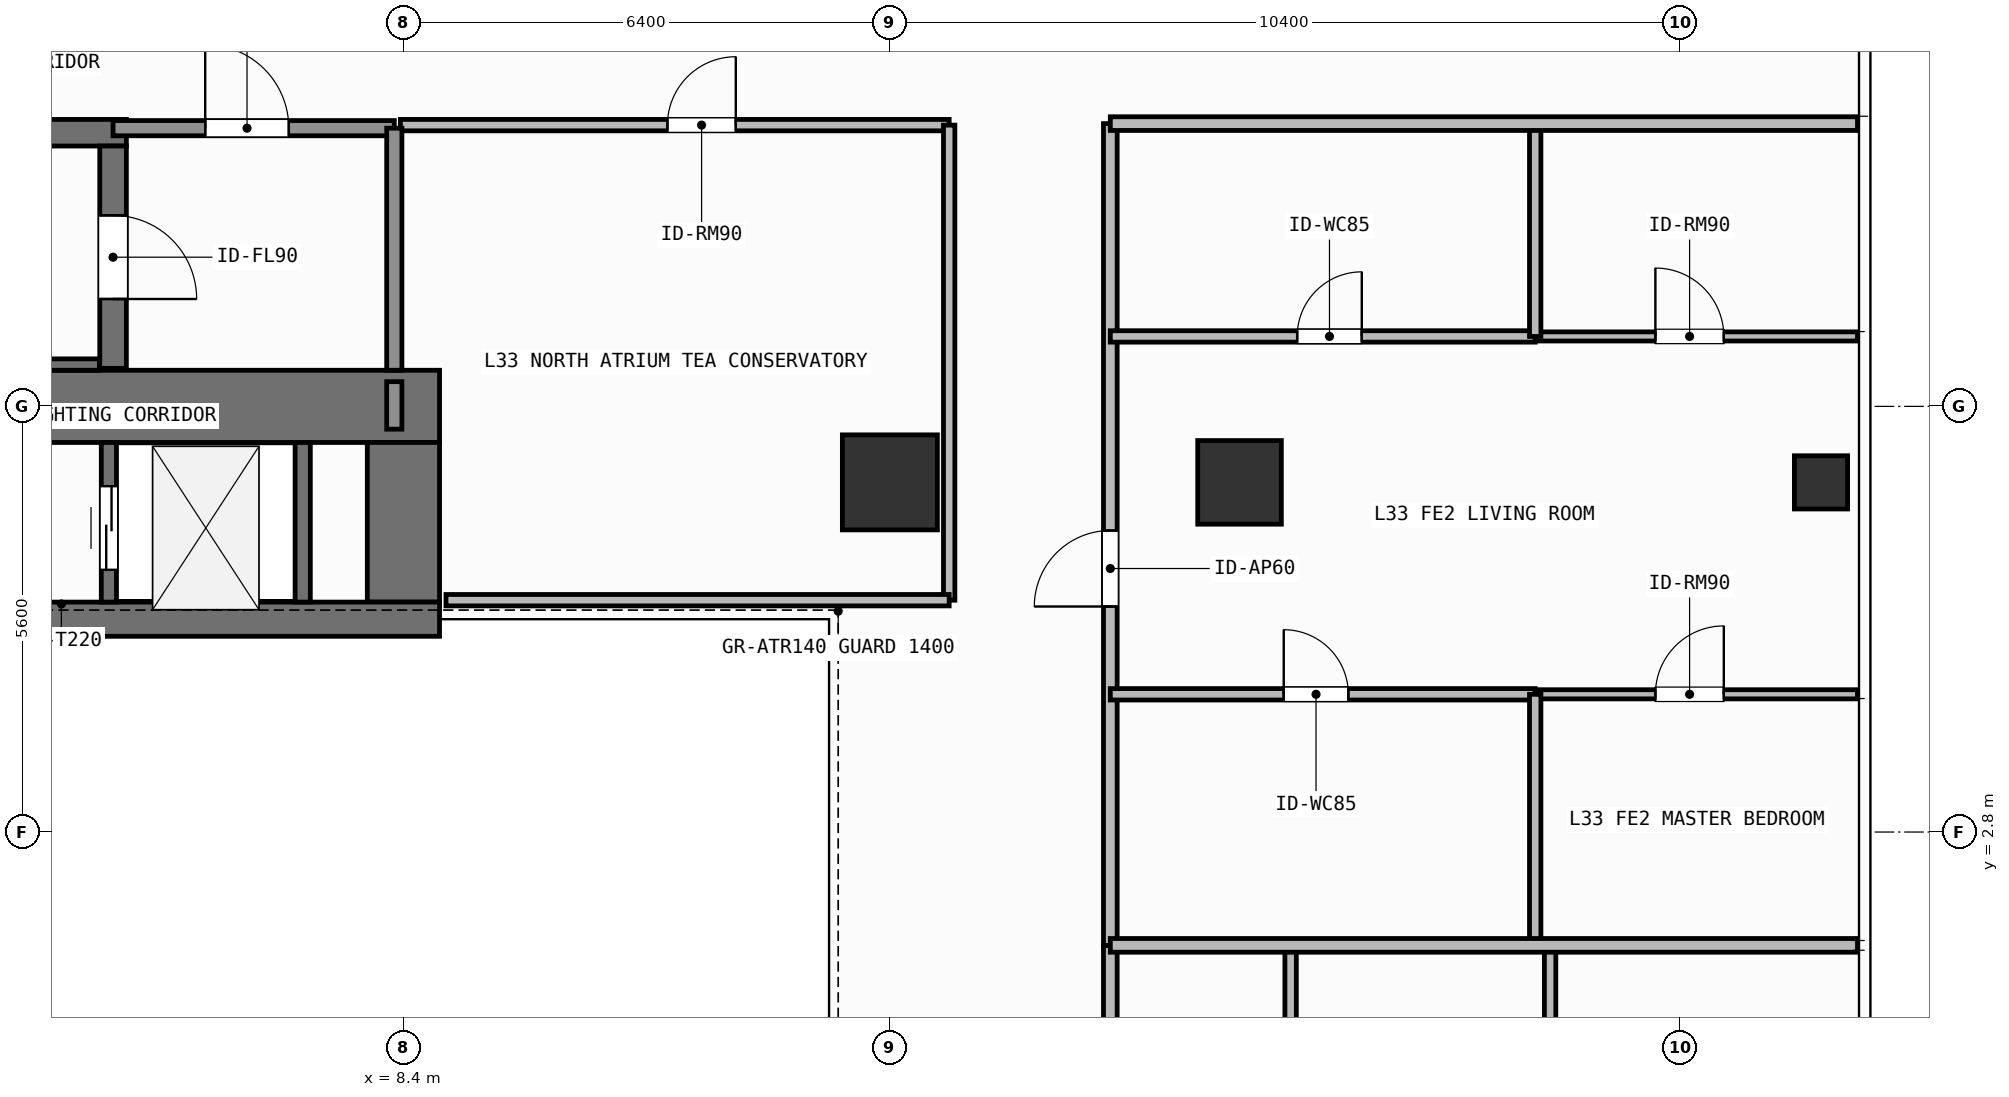
"""IFC4 building model, lengths in metres.
Left out: names, types, materials, properties, quantities, classifications, styles, units other than length and angle.
Written with IfcOpenShell. Run it as: python <this file> out.ifc"""

import sys

from ifc_helpers import new_model, si_unit, direction, frame, frame_2d, origin, origin_2d, place, context, subcontext, project, spatial, rectangle, hollow_rectangle, extrude, element, fill, save


model = new_model("IFC4")
c1 = context("Model", 3, precision=1e-05, world=origin(), true_north=direction((0.0, 1.0)))
c2 = subcontext(c1, "Body", "Model", "MODEL_VIEW")
j1 = project(units=[si_unit("LENGTHUNIT", "METRE"), si_unit("PLANEANGLEUNIT", "RADIAN")], contexts=[c1])
p1 = place(None, origin())
s1 = spatial("IfcSite", under=j1, at=p1, CompositionType="ELEMENT")
p2 = place(p1, origin())
s2 = spatial("IfcBuilding", under=s1, at=p2, CompositionType="ELEMENT")
p3 = place(p2, frame((0.0, 0.0, 132.9)))
s3 = spatial("IfcBuildingStorey", under=s2, at=p3, CompositionType="ELEMENT", Elevation=132.9)
p4 = place(p3, frame((-7.55, 8.4, 0.0), z_axis=(0.0, 0.0, 1.0), x_axis=(1.0, 0.0, 0.0)))
e1 = element("IfcWall", 1, at=p4, inside=s3, PredefinedType="SHEAR", context=c2, shape_type="SweptSolid", body=[
    extrude(rectangle(XDim=16.425, YDim=0.95, at=frame_2d((8.212, 0.0))), origin(), (0.0, 0.0, 1.0), 3.9),
])
p5 = place(p3, frame((8.4, 5.825, 0.0), z_axis=(0.0, 0.0, 1.0), x_axis=(0.0, 1.0, 0.0)))
e2 = element("IfcWall", 2, at=p5, inside=s3, PredefinedType="SHEAR", context=c2, shape_type="SweptSolid", body=[
    extrude(rectangle(XDim=2.1, YDim=0.95, at=frame_2d((1.05, 0.0))), origin(), (0.0, 0.0, 1.0), 3.9),
])
p6 = place(p3, frame((3.045, 5.6, 0.0), z_axis=(0.0, 0.0, 1.0), x_axis=(1.0, 0.0, 0.0)))
e3 = element("IfcWall", 3, at=p6, inside=s3, PredefinedType="SHEAR", context=c2, shape_type="SweptSolid", body=[
    extrude(rectangle(XDim=5.83, YDim=0.45, at=frame_2d((2.915, 0.0))), origin(), (0.0, 0.0, 1.0), 3.9),
])
p7 = place(p3, frame((-2.555, 12.0, 0.0), z_axis=(0.0, 0.0, 1.0), x_axis=(1.0, 0.0, 0.0)))
e4 = element("IfcWall", 4, at=p7, inside=s3, PredefinedType="SHEAR", context=c2, shape_type="SweptSolid", body=[
    extrude(rectangle(XDim=7.31, YDim=0.35, at=frame_2d((3.655, 0.0))), origin(), (0.0, 0.0, 1.0), 3.9),
])
p8 = place(p3, frame((-2.2, 8.95, 0.0), z_axis=(0.0, 0.0, 1.0), x_axis=(1.0, 0.0, 0.0)))
e5 = element("IfcWall", 5, at=p8, inside=s3, PredefinedType="SHEAR", context=c2, shape_type="SweptSolid", body=[
    extrude(rectangle(XDim=6.6, YDim=0.15, at=frame_2d((3.3, 0.0))), origin(), (0.0, 0.0, 1.0), 3.9),
])
p9 = place(p3, frame((4.58, 11.825, 0.0), z_axis=(0.0, 0.0, 1.0), x_axis=(0.0, -1.0, 0.0)))
e6 = element("IfcWall", 6, at=p9, inside=s3, PredefinedType="SHEAR", context=c2, shape_type="SweptSolid", body=[
    extrude(rectangle(XDim=2.925, YDim=0.35, at=frame_2d((1.462, 0.0))), origin(), (0.0, 0.0, 1.0), 3.9),
])
p10 = place(p9, frame((0.913, 0.0, 0.0)))
e7 = element("IfcOpeningElement", 7, at=p10, cuts=e6, PredefinedType="OPENING", context=c2, shape_type="SweptSolid", body=[
    extrude(rectangle(XDim=1.1, YDim=2.15, at=frame_2d((0.55, 1.075))), frame((0.0, 0.185, 0.0), z_axis=(0.0, -1.0, 0.0), x_axis=(1.0, 0.0, 0.0)), (0.0, 0.0, 1.0), 0.37),
])
p11 = place(p3, frame((14.8, 7.4, 0.0), z_axis=(0.0, 0.0, 1.0), x_axis=(1.0, 0.0, 0.0)))
e8 = element("IfcColumn", 8, at=p11, inside=s3, PredefinedType="COLUMN", context=c2, shape_type="SweptSolid", body=[
    extrude(rectangle(XDim=1.25, YDim=1.25, at=origin_2d()), origin(), (0.0, 0.0, 1.0), 3.9),
])
p12 = place(p3, frame((19.4, 7.4, 0.0), z_axis=(0.0, 0.0, 1.0), x_axis=(1.0, 0.0, 0.0)))
e9 = element("IfcColumn", 9, at=p12, inside=s3, PredefinedType="COLUMN", context=c2, shape_type="SweptSolid", body=[
    extrude(rectangle(XDim=1.1, YDim=1.1, at=origin_2d()), origin(), (0.0, 0.0, 1.0), 3.9),
])
p13 = place(p3, frame((27.05, 7.4, 0.0), z_axis=(0.0, 0.0, 1.0), x_axis=(1.0, 0.0, 0.0)))
e10 = element("IfcColumn", 10, at=p13, inside=s3, PredefinedType="COLUMN", context=c2, shape_type="SweptSolid", body=[
    extrude(hollow_rectangle(XDim=0.7, YDim=0.7, WallThickness=0.032, at=origin_2d()), origin(), (0.0, 0.0, 1.0), 3.9),
])
p14 = place(p3, frame((4.525, 5.825, 0.0), z_axis=(0.0, 0.0, 1.0), x_axis=(0.0, 1.0, 0.0)))
e11 = element("IfcWall", 11, at=p14, inside=s3, PredefinedType="SHEAR", context=c2, shape_type="SweptSolid", body=[
    extrude(rectangle(XDim=2.1, YDim=0.2, at=frame_2d((1.05, 0.0))), origin(), (0.0, 0.0, 1.0), 3.62),
])
p15 = place(p14, frame((0.425, 0.0, 0.0)))
e12 = element("IfcOpeningElement", 12, at=p15, cuts=e11, PredefinedType="OPENING", context=c2, shape_type="SweptSolid", body=[
    extrude(rectangle(XDim=1.1, YDim=2.2, at=frame_2d((0.55, 1.1))), frame((0.0, 0.11, 0.0), z_axis=(0.0, -1.0, 0.0), x_axis=(1.0, 0.0, 0.0)), (0.0, 0.0, 1.0), 0.22),
])
p16 = place(p3, frame((7.075, 5.825, 0.0), z_axis=(0.0, 0.0, 1.0), x_axis=(0.0, 1.0, 0.0)))
e13 = element("IfcWall", 13, at=p16, inside=s3, PredefinedType="SHEAR", context=c2, shape_type="SweptSolid", body=[
    extrude(rectangle(XDim=2.1, YDim=0.2, at=frame_2d((1.05, 0.0))), origin(), (0.0, 0.0, 1.0), 3.62),
])
p17 = place(p3, frame((4.58, 12.06, 0.0), z_axis=(0.0, 0.0, 1.0), x_axis=(1.0, 0.0, 0.0)))
e14 = element("IfcWall", 14, at=p17, inside=s3, PredefinedType="SOLIDWALL", context=c2, shape_type="SweptSolid", body=[
    extrude(rectangle(XDim=3.7, YDim=0.2, at=frame_2d((1.85, 0.0))), origin(), (0.0, 0.0, 1.0), 3.62),
])
p18 = place(p17, frame((1.212, 0.0, 0.0)))
e15 = element("IfcOpeningElement", 15, at=p18, cuts=e14, PredefinedType="OPENING", context=c2, shape_type="SweptSolid", body=[
    extrude(rectangle(XDim=1.1, YDim=2.15, at=frame_2d((0.55, 1.075))), frame((0.0, 0.11, 0.0), z_axis=(0.0, -1.0, 0.0), x_axis=(1.0, 0.0, 0.0)), (0.0, 0.0, 1.0), 0.22),
])
p19 = place(p3, frame((8.36, 12.1, 0.0), z_axis=(0.0, 0.0, 1.0), x_axis=(1.0, 0.0, 0.0)))
e16 = element("IfcWall", 16, at=p19, inside=s3, PredefinedType="PARTITIONING", context=c2, shape_type="SweptSolid", body=[
    extrude(rectangle(XDim=7.22, YDim=0.15, at=frame_2d((3.61, 0.0))), origin(), (0.0, 0.0, 1.0), 3.62),
])
p20 = place(p19, frame((3.513, 0.0, 0.0)))
e17 = element("IfcOpeningElement", 17, at=p20, cuts=e16, PredefinedType="OPENING", context=c2, shape_type="SweptSolid", body=[
    extrude(rectangle(XDim=0.9, YDim=2.1, at=frame_2d((0.45, 1.05))), frame((0.0, 0.085, 0.0), z_axis=(0.0, -1.0, 0.0), x_axis=(1.0, 0.0, 0.0)), (0.0, 0.0, 1.0), 0.17),
])
p21 = place(p3, frame((17.7, -12.12, 0.0), z_axis=(0.0, 0.0, 1.0), x_axis=(0.0, 1.0, 0.0)))
e18 = element("IfcWall", 18, at=p21, inside=s3, PredefinedType="PARTITIONING", context=c2, shape_type="SweptSolid", body=[
    extrude(rectangle(XDim=13.429, YDim=0.18, at=frame_2d((6.715, 0.0))), origin(), (0.0, 0.0, 1.0), 3.62),
])
p22 = place(p21, frame((5.324, 0.0, 0.0)))
e19 = element("IfcOpeningElement", 19, at=p22, cuts=e18, PredefinedType="OPENING", context=c2, shape_type="SweptSolid", body=[
    extrude(rectangle(XDim=1.0, YDim=2.2, at=frame_2d((0.5, 1.1))), frame((0.0, 0.1, 0.0), z_axis=(0.0, -1.0, 0.0), x_axis=(1.0, 0.0, 0.0)), (0.0, 0.0, 1.0), 0.2),
])
p23 = place(p3, frame((17.7, 1.309, 0.0), z_axis=(0.0, 0.0, 1.0), x_axis=(0.0, 1.0, 0.0)))
e20 = element("IfcWall", 20, at=p23, inside=s3, PredefinedType="PARTITIONING", context=c2, shape_type="SweptSolid", body=[
    extrude(rectangle(XDim=10.811, YDim=0.18, at=frame_2d((5.406, 0.0))), origin(), (0.0, 0.0, 1.0), 3.62),
])
p24 = place(p23, frame((4.458, 0.0, 0.0)))
e21 = element("IfcOpeningElement", 21, at=p24, cuts=e20, PredefinedType="OPENING", context=c2, shape_type="SweptSolid", body=[
    extrude(rectangle(XDim=1.0, YDim=2.2, at=frame_2d((0.5, 1.1))), frame((0.0, 0.1, 0.0), z_axis=(0.0, -1.0, 0.0), x_axis=(1.0, 0.0, 0.0)), (0.0, 0.0, 1.0), 0.2),
])
p25 = place(p3, frame((17.7, 9.32, 0.0), z_axis=(0.0, 0.0, 1.0), x_axis=(1.0, 0.0, 0.0)))
e22 = element("IfcWall", 22, at=p25, inside=s3, PredefinedType="PARTITIONING", context=c2, shape_type="SweptSolid", body=[
    extrude(rectangle(XDim=5.59, YDim=0.15, at=frame_2d((2.795, 0.0))), origin(), (0.0, 0.0, 1.0), 3.62),
])
p26 = place(p25, frame((2.458, 0.0, 0.0)))
e23 = element("IfcOpeningElement", 23, at=p26, cuts=e22, PredefinedType="OPENING", context=c2, shape_type="SweptSolid", body=[
    extrude(rectangle(XDim=0.85, YDim=2.1, at=frame_2d((0.425, 1.05))), frame((0.0, 0.085, 0.0), z_axis=(0.0, -1.0, 0.0), x_axis=(1.0, 0.0, 0.0)), (0.0, 0.0, 1.0), 0.17),
])
p27 = place(p3, frame((17.7, 4.612, 0.0), z_axis=(0.0, 0.0, 1.0), x_axis=(1.0, 0.0, 0.0)))
e24 = element("IfcWall", 24, at=p27, inside=s3, PredefinedType="PARTITIONING", context=c2, shape_type="SweptSolid", body=[
    extrude(rectangle(XDim=5.59, YDim=0.15, at=frame_2d((2.795, 0.0))), origin(), (0.0, 0.0, 1.0), 3.62),
])
p28 = place(p27, frame((2.281, 0.0, 0.0)))
e25 = element("IfcOpeningElement", 25, at=p28, cuts=e24, PredefinedType="OPENING", context=c2, shape_type="SweptSolid", body=[
    extrude(rectangle(XDim=0.85, YDim=2.1, at=frame_2d((0.425, 1.05))), frame((0.0, 0.085, 0.0), z_axis=(0.0, -1.0, 0.0), x_axis=(1.0, 0.0, 0.0)), (0.0, 0.0, 1.0), 0.17),
])
p29 = place(p3, frame((23.29, 4.612, 0.0), z_axis=(0.0, 0.0, 1.0), x_axis=(1.0, 0.0, 0.0)))
e26 = element("IfcWall", 26, at=p29, inside=s3, PredefinedType="PARTITIONING", context=c2, shape_type="SweptSolid", body=[
    extrude(rectangle(XDim=4.24, YDim=0.12, at=frame_2d((2.12, 0.0))), origin(), (0.0, 0.0, 1.0), 3.62),
])
p30 = place(p29, frame((1.581, 0.0, 0.0)))
e27 = element("IfcOpeningElement", 27, at=p30, cuts=e26, PredefinedType="OPENING", context=c2, shape_type="SweptSolid", body=[
    extrude(rectangle(XDim=0.9, YDim=2.1, at=frame_2d((0.45, 1.05))), frame((0.0, 0.07, 0.0), z_axis=(0.0, -1.0, 0.0), x_axis=(1.0, 0.0, 0.0)), (0.0, 0.0, 1.0), 0.14),
])
p31 = place(p3, frame((23.29, 9.32, 0.0), z_axis=(0.0, 0.0, 1.0), x_axis=(1.0, 0.0, 0.0)))
e28 = element("IfcWall", 28, at=p31, inside=s3, PredefinedType="PARTITIONING", context=c2, shape_type="SweptSolid", body=[
    extrude(rectangle(XDim=4.24, YDim=0.12, at=frame_2d((2.12, 0.0))), origin(), (0.0, 0.0, 1.0), 3.62),
])
p32 = place(p31, frame((1.581, 0.0, 0.0)))
e29 = element("IfcOpeningElement", 29, at=p32, cuts=e28, PredefinedType="OPENING", context=c2, shape_type="SweptSolid", body=[
    extrude(rectangle(XDim=0.9, YDim=2.1, at=frame_2d((0.45, 1.05))), frame((0.0, 0.07, 0.0), z_axis=(0.0, -1.0, 0.0), x_axis=(1.0, 0.0, 0.0)), (0.0, 0.0, 1.0), 0.14),
])
p33 = place(p3, frame((8.28, 8.875, 0.0), z_axis=(0.0, 0.0, 1.0), x_axis=(0.0, 1.0, 0.0)))
e30 = element("IfcWall", 30, at=p33, inside=s3, PredefinedType="SOLIDWALL", context=c2, shape_type="SweptSolid", body=[
    extrude(rectangle(XDim=3.185, YDim=0.2, at=frame_2d((1.593, 0.0))), origin(), (0.0, 0.0, 1.0), 3.62),
])
p34 = place(p3, frame((8.28, 8.1, 0.0), z_axis=(0.0, 0.0, 1.0), x_axis=(0.0, 1.0, 0.0)))
e31 = element("IfcWall", 31, at=p34, inside=s3, PredefinedType="SOLIDWALL", context=c2, shape_type="SweptSolid", body=[
    extrude(rectangle(XDim=0.625, YDim=0.2, at=frame_2d((0.312, 0.0))), origin(), (0.0, 0.0, 1.0), 3.62),
])
p35 = place(p3, frame((15.58, 5.85, 0.0), z_axis=(0.0, 0.0, 1.0), x_axis=(0.0, 1.0, 0.0)))
e32 = element("IfcWall", 32, at=p35, inside=s3, PredefinedType="PARTITIONING", context=c2, shape_type="SweptSolid", body=[
    extrude(rectangle(XDim=6.25, YDim=0.15, at=frame_2d((3.125, 0.0))), origin(), (0.0, 0.0, 1.0), 3.62),
])
p36 = place(p3, frame((8.96, 5.85, 0.0), z_axis=(0.0, 0.0, 1.0), x_axis=(1.0, 0.0, 0.0)))
e33 = element("IfcWall", 33, at=p36, inside=s3, PredefinedType="PARTITIONING", context=c2, shape_type="SweptSolid", body=[
    extrude(rectangle(XDim=6.62, YDim=0.15, at=frame_2d((3.31, 0.0))), origin(), (0.0, 0.0, 1.0), 3.62),
])
for number, where, z_axis, x_axis in (
    (34, (20.072, -3.317, 0.0), (0.0, 0.0, 1.0), (0.0, 1.0, 0.0)),
    (35, (23.486, -3.317, 0.0), (0.0, 0.0, 1.0), (0.0, 1.0, 0.0)),
):
    element("IfcWall", number, at=place(p3, frame(where, z_axis=z_axis, x_axis=x_axis)), inside=s3, PredefinedType="PARTITIONING", context=c2, shape_type="SweptSolid", body=[
        extrude(rectangle(XDim=4.626, YDim=0.15, at=frame_2d((2.313, 0.0))), origin(), (0.0, 0.0, 1.0), 3.62),
    ])
p37 = place(p3, frame((23.29, 1.309, 0.0), z_axis=(0.0, 0.0, 1.0), x_axis=(0.0, 1.0, 0.0)))
e36 = element("IfcWall", 36, at=p37, inside=s3, PredefinedType="PARTITIONING", context=c2, shape_type="SweptSolid", body=[
    extrude(rectangle(XDim=3.303, YDim=0.15, at=frame_2d((1.651, 0.0))), origin(), (0.0, 0.0, 1.0), 3.62),
])
p38 = place(p3, frame((23.29, 9.32, 0.0), z_axis=(0.0, 0.0, 1.0), x_axis=(0.0, 1.0, 0.0)))
e37 = element("IfcWall", 37, at=p38, inside=s3, PredefinedType="PARTITIONING", context=c2, shape_type="SweptSolid", body=[
    extrude(rectangle(XDim=2.8, YDim=0.15, at=frame_2d((1.4, 0.0))), origin(), (0.0, 0.0, 1.0), 3.62),
])
for number, where, z_axis, x_axis in (
    (38, (17.7, 1.309, 0.0), (0.0, 0.0, 1.0), (1.0, 0.0, 0.0)),
    (39, (17.7, 12.12, 0.0), (0.0, 0.0, 1.0), (1.0, 0.0, 0.0)),
):
    element("IfcWall", number, at=place(p3, frame(where, z_axis=z_axis, x_axis=x_axis)), inside=s3, PredefinedType="PARTITIONING", context=c2, shape_type="SweptSolid", body=[
        extrude(rectangle(XDim=9.83, YDim=0.18, at=frame_2d((4.915, 0.0))), origin(), (0.0, 0.0, 1.0), 3.62),
    ])
p39 = place(p15, origin())
e40 = element("IfcDoor", 40, at=p39, inside=s3, OperationType="SLIDING_TO_LEFT", PredefinedType="DOOR", context=c2, shape_type="SweptSolid", body=[
    extrude(rectangle(XDim=1.1, YDim=2.2, at=frame_2d((0.55, 1.1))), frame((0.0, 0.025, 0.0), z_axis=(0.0, -1.0, 0.0), x_axis=(1.0, 0.0, 0.0)), (0.0, 0.0, 1.0), 0.05),
])
fill(e12, e40)
p40 = place(p10, origin())
e41 = element("IfcDoor", 41, at=p40, inside=s3, OperationType="SINGLE_SWING_RIGHT", PredefinedType="DOOR", context=c2, shape_type="SweptSolid", body=[
    extrude(rectangle(XDim=1.1, YDim=2.15, at=frame_2d((0.55, 1.075))), frame((0.0, 0.025, 0.0), z_axis=(0.0, -1.0, 0.0), x_axis=(1.0, 0.0, 0.0)), (0.0, 0.0, 1.0), 0.05),
])
fill(e7, e41)
p41 = place(p18, origin())
e42 = element("IfcDoor", 42, at=p41, inside=s3, OperationType="SINGLE_SWING_LEFT", PredefinedType="DOOR", context=c2, shape_type="SweptSolid", body=[
    extrude(rectangle(XDim=1.1, YDim=2.15, at=frame_2d((0.55, 1.075))), frame((0.0, 0.025, 0.0), z_axis=(0.0, -1.0, 0.0), x_axis=(1.0, 0.0, 0.0)), (0.0, 0.0, 1.0), 0.05),
])
fill(e15, e42)
p42 = place(p20, origin())
e43 = element("IfcDoor", 43, at=p42, inside=s3, OperationType="SINGLE_SWING_RIGHT", PredefinedType="DOOR", context=c2, shape_type="SweptSolid", body=[
    extrude(rectangle(XDim=0.9, YDim=2.1, at=frame_2d((0.45, 1.05))), frame((0.0, 0.025, 0.0), z_axis=(0.0, -1.0, 0.0), x_axis=(1.0, 0.0, 0.0)), (0.0, 0.0, 1.0), 0.05),
])
fill(e17, e43)
p43 = place(p24, origin())
e44 = element("IfcDoor", 44, at=p43, inside=s3, OperationType="SINGLE_SWING_LEFT", PredefinedType="DOOR", context=c2, shape_type="SweptSolid", body=[
    extrude(rectangle(XDim=1.0, YDim=2.2, at=frame_2d((0.5, 1.1))), frame((0.0, 0.025, 0.0), z_axis=(0.0, -1.0, 0.0), x_axis=(1.0, 0.0, 0.0)), (0.0, 0.0, 1.0), 0.05),
])
fill(e21, e44)
p44 = place(p26, origin())
e45 = element("IfcDoor", 45, at=p44, inside=s3, OperationType="SINGLE_SWING_RIGHT", PredefinedType="DOOR", context=c2, shape_type="SweptSolid", body=[
    extrude(rectangle(XDim=0.85, YDim=2.1, at=frame_2d((0.425, 1.05))), frame((0.0, 0.025, 0.0), z_axis=(0.0, -1.0, 0.0), x_axis=(1.0, 0.0, 0.0)), (0.0, 0.0, 1.0), 0.05),
])
fill(e23, e45)
p45 = place(p28, origin())
e46 = element("IfcDoor", 46, at=p45, inside=s3, OperationType="SINGLE_SWING_LEFT", PredefinedType="DOOR", context=c2, shape_type="SweptSolid", body=[
    extrude(rectangle(XDim=0.85, YDim=2.1, at=frame_2d((0.425, 1.05))), frame((0.0, 0.025, 0.0), z_axis=(0.0, -1.0, 0.0), x_axis=(1.0, 0.0, 0.0)), (0.0, 0.0, 1.0), 0.05),
])
fill(e25, e46)
p46 = place(p30, origin())
e47 = element("IfcDoor", 47, at=p46, inside=s3, OperationType="SINGLE_SWING_RIGHT", PredefinedType="DOOR", context=c2, shape_type="SweptSolid", body=[
    extrude(rectangle(XDim=0.9, YDim=2.1, at=frame_2d((0.45, 1.05))), frame((0.0, 0.025, 0.0), z_axis=(0.0, -1.0, 0.0), x_axis=(1.0, 0.0, 0.0)), (0.0, 0.0, 1.0), 0.05),
])
fill(e27, e47)
p47 = place(p32, origin())
e48 = element("IfcDoor", 48, at=p47, inside=s3, OperationType="SINGLE_SWING_LEFT", PredefinedType="DOOR", context=c2, shape_type="SweptSolid", body=[
    extrude(rectangle(XDim=0.9, YDim=2.1, at=frame_2d((0.45, 1.05))), frame((0.0, 0.025, 0.0), z_axis=(0.0, -1.0, 0.0), x_axis=(1.0, 0.0, 0.0)), (0.0, 0.0, 1.0), 0.05),
])
fill(e29, e48)
save(model, sys.argv[1])
